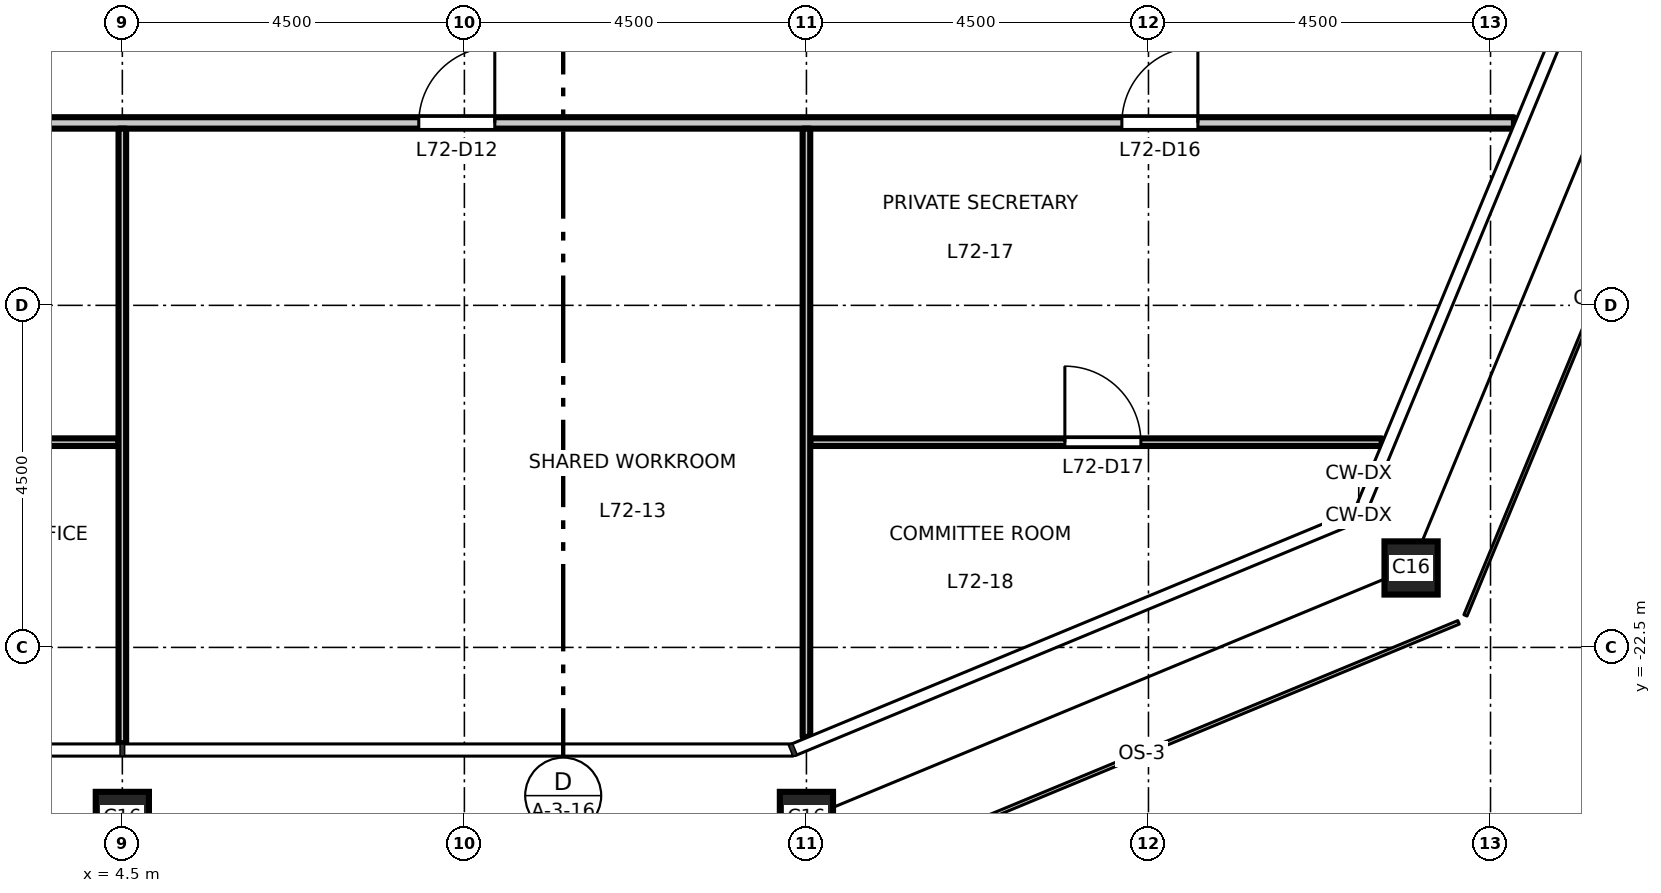
"""IFC4 building model, lengths in metres.
Left out: names, types, materials, properties, quantities, classifications, styles, units other than length and angle.
Written with IfcOpenShell. Run it as: python <this file> out.ifc"""

import sys

from ifc_helpers import new_model, si_unit, direction, frame, frame_2d, origin, origin_2d, place, context, subcontext, project, spatial, rectangle, hollow_rectangle, extrude, element, fill, save


model = new_model("IFC4")
c1 = context("Model", 3, precision=1e-05, world=origin(), true_north=direction((0.0, 1.0)))
c2 = subcontext(c1, "Body", "Model", "MODEL_VIEW")
j1 = project(units=[si_unit("LENGTHUNIT", "METRE"), si_unit("PLANEANGLEUNIT", "RADIAN")], contexts=[c1])
p1 = place(None, origin())
s1 = spatial("IfcSite", under=j1, at=p1, CompositionType="ELEMENT")
p2 = place(p1, origin())
s2 = spatial("IfcBuilding", under=s1, at=p2, CompositionType="ELEMENT")
p3 = place(p2, frame((0.0, 0.0, 334.7)))
s3 = spatial("IfcBuildingStorey", under=s2, at=p3, CompositionType="ELEMENT", Elevation=334.7)
for number, where, z_axis, x_axis in (
    (1, (4.5, -24.75, 0.0), (0.0, 0.0, 1.0), (1.0, 0.0, 0.0)),
    (2, (13.5, -24.75, 0.0), (0.0, 0.0, 1.0), (1.0, 0.0, 0.0)),
    (3, (21.455, -21.455, 0.0), (0.0, 0.0, 1.0), (1.0, 0.0, 0.0)),
):
    element("IfcColumn", number, at=place(p3, frame(where, z_axis=z_axis, x_axis=x_axis)), inside=s3, PredefinedType="COLUMN", context=c2, shape_type="SweptSolid", body=[
        extrude(hollow_rectangle(XDim=0.7, YDim=0.7, WallThickness=0.036, at=origin_2d()), origin(), (0.0, 0.0, 1.0), 4.5),
    ])
p4 = place(p3, frame((-4.45, -19.8, 0.0), z_axis=(0.0, 0.0, 1.0), x_axis=(1.0, 0.0, 0.0)))
e4 = element("IfcWall", 4, at=p4, inside=s3, PredefinedType="PARTITIONING", context=c2, shape_type="SweptSolid", body=[
    extrude(rectangle(XDim=8.9, YDim=0.1, at=frame_2d((4.45, 0.0))), origin(), (0.0, 0.0, 1.0), 4.35),
])
p5 = place(p4, frame((3.85, 0.0, 0.0)))
e5 = element("IfcOpeningElement", 5, at=p5, cuts=e4, PredefinedType="OPENING", context=c2, shape_type="SweptSolid", body=[
    extrude(rectangle(XDim=1.0, YDim=2.1, at=frame_2d((0.5, 1.05))), frame((0.0, 0.06, 0.0), z_axis=(0.0, -1.0, 0.0), x_axis=(1.0, 0.0, 0.0)), (0.0, 0.0, 1.0), 0.12),
])
p6 = place(p3, frame((13.55, -19.8, 0.0), z_axis=(0.0, 0.0, 1.0), x_axis=(1.0, 0.0, 0.0)))
e6 = element("IfcWall", 6, at=p6, inside=s3, PredefinedType="PARTITIONING", context=c2, shape_type="SweptSolid", body=[
    extrude(rectangle(XDim=7.519, YDim=0.1, at=frame_2d((3.76, 0.0))), origin(), (0.0, 0.0, 1.0), 4.35),
])
p7 = place(p6, frame((3.35, 0.0, 0.0)))
e7 = element("IfcOpeningElement", 7, at=p7, cuts=e6, PredefinedType="OPENING", context=c2, shape_type="SweptSolid", body=[
    extrude(rectangle(XDim=1.0, YDim=2.1, at=frame_2d((0.5, 1.05))), frame((0.0, 0.06, 0.0), z_axis=(0.0, -1.0, 0.0), x_axis=(1.0, 0.0, 0.0)), (0.0, 0.0, 1.0), 0.12),
])
p8 = place(p3, frame((-22.808, -15.6, 0.0), z_axis=(0.0, 0.0, 1.0), x_axis=(1.0, 0.0, 0.0)))
e8 = element("IfcWall", 8, at=p8, inside=s3, PredefinedType="PARTITIONING", context=c2, shape_type="SweptSolid", body=[
    extrude(rectangle(XDim=45.616, YDim=0.15, at=frame_2d((22.808, 0.0))), origin(), (0.0, 0.0, 1.0), 4.35),
])
p9 = place(p8, frame((13.208, 0.0, 0.0)))
e9 = element("IfcOpeningElement", 9, at=p9, cuts=e8, PredefinedType="OPENING", context=c2, shape_type="SweptSolid", body=[
    extrude(rectangle(XDim=1.0, YDim=2.1, at=frame_2d((0.5, 1.05))), frame((0.0, 0.085, 0.0), z_axis=(0.0, -1.0, 0.0), x_axis=(1.0, 0.0, 0.0)), (0.0, 0.0, 1.0), 0.17),
])
p10 = place(p8, frame((22.208, 0.0, 0.0)))
e10 = element("IfcOpeningElement", 10, at=p10, cuts=e8, PredefinedType="OPENING", context=c2, shape_type="SweptSolid", body=[
    extrude(rectangle(XDim=1.0, YDim=2.1, at=frame_2d((0.5, 1.05))), frame((0.0, 0.085, 0.0), z_axis=(0.0, -1.0, 0.0), x_axis=(1.0, 0.0, 0.0)), (0.0, 0.0, 1.0), 0.17),
])
p11 = place(p8, frame((31.208, 0.0, 0.0)))
e11 = element("IfcOpeningElement", 11, at=p11, cuts=e8, PredefinedType="OPENING", context=c2, shape_type="SweptSolid", body=[
    extrude(rectangle(XDim=1.0, YDim=2.1, at=frame_2d((0.5, 1.05))), frame((0.0, 0.085, 0.0), z_axis=(0.0, -1.0, 0.0), x_axis=(1.0, 0.0, 0.0)), (0.0, 0.0, 1.0), 0.17),
])
p12 = place(p8, frame((4.15, 0.0, 0.0)))
e12 = element("IfcOpeningElement", 12, at=p12, cuts=e8, PredefinedType="OPENING", context=c2, shape_type="SweptSolid", body=[
    extrude(rectangle(XDim=1.0, YDim=2.1, at=frame_2d((0.5, 1.05))), frame((0.0, 0.085, 0.0), z_axis=(0.0, -1.0, 0.0), x_axis=(1.0, 0.0, 0.0)), (0.0, 0.0, 1.0), 0.17),
])
p13 = place(p8, frame((40.458, 0.0, 0.0)))
e13 = element("IfcOpeningElement", 13, at=p13, cuts=e8, PredefinedType="OPENING", context=c2, shape_type="SweptSolid", body=[
    extrude(rectangle(XDim=1.0, YDim=2.1, at=frame_2d((0.5, 1.05))), frame((0.0, 0.085, 0.0), z_axis=(0.0, -1.0, 0.0), x_axis=(1.0, 0.0, 0.0)), (0.0, 0.0, 1.0), 0.17),
])
p14 = place(p3, frame((4.5, -23.76, 0.0), z_axis=(0.0, 0.0, 1.0), x_axis=(0.0, 1.0, 0.0)))
e14 = element("IfcWall", 14, at=p14, inside=s3, PredefinedType="PARTITIONING", context=c2, shape_type="SweptSolid", body=[
    extrude(rectangle(XDim=8.085, YDim=0.1, at=frame_2d((4.042, 0.0))), origin(), (0.0, 0.0, 1.0), 3.65),
])
p15 = place(p3, frame((13.5, -23.678, 0.0), z_axis=(0.0, 0.0, 1.0), x_axis=(0.0, 1.0, 0.0)))
e15 = element("IfcWall", 15, at=p15, inside=s3, PredefinedType="PARTITIONING", context=c2, shape_type="SweptSolid", body=[
    extrude(rectangle(XDim=8.003, YDim=0.1, at=frame_2d((4.001, 0.0))), origin(), (0.0, 0.0, 1.0), 3.75),
])
p16 = place(p11, origin())
e16 = element("IfcDoor", 16, at=p16, inside=s3, OperationType="SINGLE_SWING_RIGHT", PredefinedType="DOOR", context=c2, shape_type="SweptSolid", body=[
    extrude(rectangle(XDim=1.0, YDim=2.1, at=frame_2d((0.5, 1.05))), frame((0.0, 0.025, 0.0), z_axis=(0.0, -1.0, 0.0), x_axis=(1.0, 0.0, 0.0)), (0.0, 0.0, 1.0), 0.05),
])
fill(e11, e16)
p17 = place(p13, origin())
e17 = element("IfcDoor", 17, at=p17, inside=s3, OperationType="SINGLE_SWING_RIGHT", PredefinedType="DOOR", context=c2, shape_type="SweptSolid", body=[
    extrude(rectangle(XDim=1.0, YDim=2.1, at=frame_2d((0.5, 1.05))), frame((0.0, 0.025, 0.0), z_axis=(0.0, -1.0, 0.0), x_axis=(1.0, 0.0, 0.0)), (0.0, 0.0, 1.0), 0.05),
])
fill(e13, e17)
p18 = place(p7, origin())
e18 = element("IfcDoor", 18, at=p18, inside=s3, OperationType="SINGLE_SWING_LEFT", PredefinedType="DOOR", context=c2, shape_type="SweptSolid", body=[
    extrude(rectangle(XDim=1.0, YDim=2.1, at=frame_2d((0.5, 1.05))), frame((0.0, 0.025, 0.0), z_axis=(0.0, -1.0, 0.0), x_axis=(1.0, 0.0, 0.0)), (0.0, 0.0, 1.0), 0.05),
])
fill(e7, e18)
save(model, sys.argv[1])
